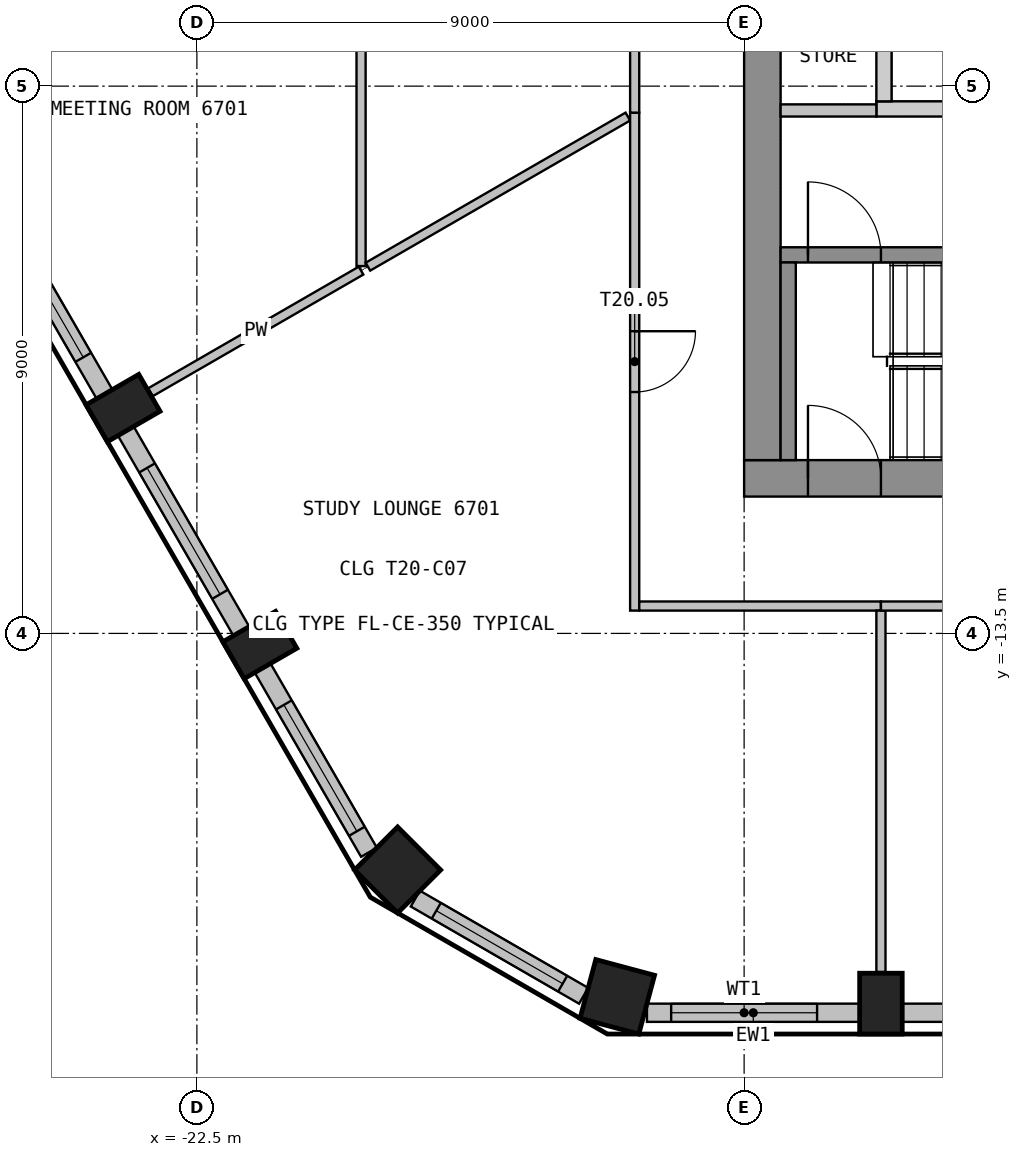
"""IFC4 building model, lengths in metres.
Left out: names, types, materials, properties, quantities, classifications, styles, units other than length and angle.
Written with IfcOpenShell. Run it as: python <this file> out.ifc"""

import sys

from ifc_helpers import new_model, si_unit, direction, frame, frame_2d, origin, origin_2d, place, context, subcontext, project, spatial, polyline, rectangle, outline, extrude, element, fill, save


model = new_model("IFC4")
c1 = context("Model", 3, precision=1e-05, world=origin(), true_north=direction((0.0, 1.0)))
c2 = subcontext(c1, "Body", "Model", "MODEL_VIEW")
j1 = project(units=[si_unit("LENGTHUNIT", "METRE"), si_unit("PLANEANGLEUNIT", "RADIAN")], contexts=[c1])
p1 = place(None, origin())
s1 = spatial("IfcSite", under=j1, at=p1, CompositionType="ELEMENT")
p2 = place(p1, origin())
s2 = spatial("IfcBuilding", under=s1, at=p2, CompositionType="ELEMENT")
p3 = place(p2, frame((0.0, 0.0, 270.3)))
s3 = spatial("IfcBuildingStorey", under=s2, at=p3, CompositionType="ELEMENT", Elevation=270.3)
p4 = place(p3, frame((-15.586, -19.476, 0.0), z_axis=(0.0, 0.0, 1.0), x_axis=(0.965925826289, -0.258819045103, 0.0)))
e1 = element("IfcColumn", 1, at=p4, inside=s3, PredefinedType="COLUMN", context=c2, shape_type="SweptSolid", body=[
    extrude(rectangle(XDim=1.0, YDim=1.0, at=origin_2d()), origin(), (0.0, 0.0, 1.0), 3.575),
])
for number, where, z_axis, x_axis in (
    (2, (-11.25, -19.588, 0.0), (0.0, 0.0, 1.0), (1.0, 0.0, 0.0)),
    (3, (-23.714, -9.794, 0.0), (0.0, 0.0, 1.0), (0.5, -0.866, 0.0)),
    (4, (-21.464, -13.691, 0.0), (0.0, 0.0, 1.0), (0.5, -0.866, 0.0)),
):
    element("IfcColumn", number, at=place(p3, frame(where, z_axis=z_axis, x_axis=x_axis)), inside=s3, PredefinedType="COLUMN", context=c2, shape_type="SweptSolid", body=[
        extrude(rectangle(XDim=0.7, YDim=1.0, at=origin_2d()), origin(), (0.0, 0.0, 1.0), 3.575),
    ])
p5 = place(p3, frame((-19.199, -17.39, 0.0), z_axis=(0.0, 0.0, 1.0), x_axis=(0.707106781187, -0.707106781187, 0.0)))
e5 = element("IfcColumn", 5, at=p5, inside=s3, PredefinedType="COLUMN", context=c2, shape_type="SweptSolid", body=[
    extrude(rectangle(XDim=1.0, YDim=1.0, at=origin_2d()), origin(), (0.0, 0.0, 1.0), 3.575),
])
p6 = place(p3, frame((-15.098, -19.739, 0.0), z_axis=(0.0, 0.0, 1.0), x_axis=(1.0, 0.0, 0.0)))
e6 = element("IfcWall", 6, at=p6, inside=s3, PredefinedType="SOLIDWALL", context=c2, shape_type="SweptSolid", body=[
    extrude(rectangle(XDim=3.498, YDim=0.3, at=frame_2d((1.749, 0.0))), origin(), (0.0, 0.0, 1.0), 3.575),
])
p7 = place(p6, frame((0.398, 0.0, 0.9)))
e7 = element("IfcOpeningElement", 7, at=p7, cuts=e6, PredefinedType="OPENING", context=c2, shape_type="SweptSolid", body=[
    extrude(rectangle(XDim=2.4, YDim=2.1, at=frame_2d((1.2, 1.05))), frame((0.0, 0.16, 0.0), z_axis=(0.0, -1.0, 0.0), x_axis=(1.0, 0.0, 0.0)), (0.0, 0.0, 1.0), 0.32),
])
p8 = place(p3, frame((-10.899, -19.739, 0.0), z_axis=(0.0, 0.0, 1.0), x_axis=(1.0, 0.0, 0.0)))
e8 = element("IfcWall", 8, at=p8, inside=s3, PredefinedType="SOLIDWALL", context=c2, shape_type="SweptSolid", body=[
    extrude(rectangle(XDim=3.799, YDim=0.3, at=frame_2d((1.899, 0.0))), origin(), (0.0, 0.0, 1.0), 3.575),
])
p9 = place(p8, frame((0.699, 0.0, 0.9)))
e9 = element("IfcOpeningElement", 9, at=p9, cuts=e8, PredefinedType="OPENING", context=c2, shape_type="SweptSolid", body=[
    extrude(rectangle(XDim=2.4, YDim=2.1, at=frame_2d((1.2, 1.05))), frame((0.0, 0.16, 0.0), z_axis=(0.0, -1.0, 0.0), x_axis=(1.0, 0.0, 0.0)), (0.0, 0.0, 1.0), 0.32),
])
p10 = place(p3, frame((-25.919, -6.276, 0.0), z_axis=(0.0, 0.0, 1.0), x_axis=(0.499982058975, -0.866035761792, 0.0)))
e10 = element("IfcWall", 10, at=p10, inside=s3, PredefinedType="SOLIDWALL", context=c2, shape_type="SweptSolid", body=[
    extrude(rectangle(XDim=3.799, YDim=0.3, at=frame_2d((1.899, 0.0))), origin(), (0.0, 0.0, 1.0), 3.575),
])
p11 = place(p10, frame((0.699, 0.0, 0.9)))
e11 = element("IfcOpeningElement", 11, at=p11, cuts=e10, PredefinedType="OPENING", context=c2, shape_type="SweptSolid", body=[
    extrude(rectangle(XDim=2.4, YDim=2.1, at=frame_2d((1.2, 1.05))), frame((0.0, 0.16, 0.0), z_axis=(0.0, -1.0, 0.0), x_axis=(1.0, 0.0, 0.0)), (0.0, 0.0, 1.0), 0.32),
])
p12 = place(p3, frame((-23.669, -10.173, 0.0), z_axis=(0.0, 0.0, 1.0), x_axis=(0.499982058975, -0.866035761792, 0.0)))
e12 = element("IfcWall", 12, at=p12, inside=s3, PredefinedType="SOLIDWALL", context=c2, shape_type="SweptSolid", body=[
    extrude(rectangle(XDim=3.799, YDim=0.3, at=frame_2d((1.899, 0.0))), origin(), (0.0, 0.0, 1.0), 3.575),
])
p13 = place(p12, frame((0.699, 0.0, 0.9)))
e13 = element("IfcOpeningElement", 13, at=p13, cuts=e12, PredefinedType="OPENING", context=c2, shape_type="SweptSolid", body=[
    extrude(rectangle(XDim=2.4, YDim=2.1, at=frame_2d((1.2, 1.05))), frame((0.0, 0.16, 0.0), z_axis=(0.0, -1.0, 0.0), x_axis=(1.0, 0.0, 0.0)), (0.0, 0.0, 1.0), 0.32),
])
p14 = place(p3, frame((-21.419, -14.07, 0.0), z_axis=(0.0, 0.0, 1.0), x_axis=(0.499960102815, -0.866048437209, 0.0)))
e14 = element("IfcWall", 14, at=p14, inside=s3, PredefinedType="SOLIDWALL", context=c2, shape_type="SweptSolid", body=[
    extrude(rectangle(XDim=3.498, YDim=0.3, at=frame_2d((1.749, 0.0))), origin(), (0.0, 0.0, 1.0), 3.575),
])
p15 = place(p14, frame((0.699, 0.0, 0.9)))
e15 = element("IfcOpeningElement", 15, at=p15, cuts=e14, PredefinedType="OPENING", context=c2, shape_type="SweptSolid", body=[
    extrude(rectangle(XDim=2.4, YDim=2.1, at=frame_2d((1.2, 1.05))), frame((0.0, 0.16, 0.0), z_axis=(0.0, -1.0, 0.0), x_axis=(1.0, 0.0, 0.0)), (0.0, 0.0, 1.0), 0.32),
])
p16 = place(p3, frame((-18.908, -17.861, 0.0), z_axis=(0.0, 0.0, 1.0), x_axis=(0.866025316205, -0.500000151692, 0.0)))
e16 = element("IfcWall", 16, at=p16, inside=s3, PredefinedType="SOLIDWALL", context=c2, shape_type="SweptSolid", body=[
    extrude(rectangle(XDim=3.196, YDim=0.3, at=frame_2d((1.598, 0.0))), origin(), (0.0, 0.0, 1.0), 3.575),
])
p17 = place(p16, frame((0.398, 0.0, 0.9)))
e17 = element("IfcOpeningElement", 17, at=p17, cuts=e16, PredefinedType="OPENING", context=c2, shape_type="SweptSolid", body=[
    extrude(rectangle(XDim=2.4, YDim=2.1, at=frame_2d((1.2, 1.05))), frame((0.0, 0.16, 0.0), z_axis=(0.0, -1.0, 0.0), x_axis=(1.0, 0.0, 0.0)), (0.0, 0.0, 1.0), 0.32),
])
p18 = place(p3, frame((-13.5, -10.95, 0.0), z_axis=(0.0, 0.0, 1.0), x_axis=(1.0, 0.0, 0.0)))
e18 = element("IfcWall", 18, at=p18, inside=s3, PredefinedType="SHEAR", context=c2, shape_type="SweptSolid", body=[
    extrude(rectangle(XDim=27.0, YDim=0.6, at=frame_2d((13.5, 0.0))), origin(), (0.0, 0.0, 1.0), 3.575),
])
p19 = place(p18, frame((12.3, 0.0, 0.0)))
e19 = element("IfcOpeningElement", 19, at=p19, cuts=e18, PredefinedType="OPENING", context=c2, shape_type="SweptSolid", body=[
    extrude(rectangle(XDim=2.4, YDim=2.1, at=frame_2d((1.2, 1.05))), frame((0.0, 0.31, 0.0), z_axis=(0.0, -1.0, 0.0), x_axis=(1.0, 0.0, 0.0)), (0.0, 0.0, 1.0), 0.62),
])
p20 = place(p18, frame((1.05, 0.0, 0.0)))
e20 = element("IfcOpeningElement", 20, at=p20, cuts=e18, PredefinedType="OPENING", context=c2, shape_type="SweptSolid", body=[
    extrude(rectangle(XDim=1.2, YDim=2.1, at=frame_2d((0.6, 1.05))), frame((0.0, 0.31, 0.0), z_axis=(0.0, -1.0, 0.0), x_axis=(1.0, 0.0, 0.0)), (0.0, 0.0, 1.0), 0.62),
])
p21 = place(p18, frame((24.75, 0.0, 0.0)))
e21 = element("IfcOpeningElement", 21, at=p21, cuts=e18, PredefinedType="OPENING", context=c2, shape_type="SweptSolid", body=[
    extrude(rectangle(XDim=1.2, YDim=2.1, at=frame_2d((0.6, 1.05))), frame((0.0, 0.31, 0.0), z_axis=(0.0, -1.0, 0.0), x_axis=(1.0, 0.0, 0.0)), (0.0, 0.0, 1.0), 0.62),
])
p22 = place(p3, frame((-13.2, -10.65, 0.0), z_axis=(0.0, 0.0, 1.0), x_axis=(0.0, 1.0, 0.0)))
e22 = element("IfcWall", 22, at=p22, inside=s3, PredefinedType="SHEAR", context=c2, shape_type="SweptSolid", body=[
    extrude(rectangle(XDim=21.3, YDim=0.6, at=frame_2d((10.65, 0.0))), origin(), (0.0, 0.0, 1.0), 3.575),
])
p23 = place(p22, frame((9.45, 0.0, 0.0)))
e23 = element("IfcOpeningElement", 23, at=p23, cuts=e22, PredefinedType="OPENING", context=c2, shape_type="SweptSolid", body=[
    extrude(rectangle(XDim=2.4, YDim=2.1, at=frame_2d((1.2, 1.05))), frame((0.0, 0.31, 0.0), z_axis=(0.0, -1.0, 0.0), x_axis=(1.0, 0.0, 0.0)), (0.0, 0.0, 1.0), 0.62),
])
p24 = place(p3, origin())
e24 = element("IfcWall", 24, at=p24, inside=s3, PredefinedType="SHEAR", context=c2, shape_type="SweptSolid", body=[
    extrude(outline(polyline([(-11.325, -5.0), (-2.675, -5.0), (-2.675, -4.75), (-11.325, -4.75), (-11.325, -5.0)])), origin(), (0.0, 0.0, 1.0), 3.575),
])
p25 = place(p3, origin())
e25 = element("IfcWall", 25, at=p25, inside=s3, PredefinedType="SHEAR", context=c2, shape_type="SweptSolid", body=[
    extrude(outline(polyline([(-11.325, -4.75), (-11.075, -4.75), (-11.075, -2.05), (-11.325, -2.05), (-11.325, -4.75)])), origin(), (0.0, 0.0, 1.0), 3.575),
])
p26 = place(p3, frame((-12.9, -7.275, 0.0), z_axis=(0.0, 0.0, 1.0), x_axis=(1.0, 0.0, 0.0)))
e26 = element("IfcWall", 26, at=p26, inside=s3, PredefinedType="SHEAR", context=c2, shape_type="SweptSolid", body=[
    extrude(rectangle(XDim=10.1, YDim=0.25, at=frame_2d((5.05, 0.0))), origin(), (0.0, 0.0, 1.0), 3.575),
])
p27 = place(p26, frame((0.45, 0.0, 0.0)))
e27 = element("IfcOpeningElement", 27, at=p27, cuts=e26, PredefinedType="OPENING", context=c2, shape_type="SweptSolid", body=[
    extrude(rectangle(XDim=1.2, YDim=2.1, at=frame_2d((0.6, 1.05))), frame((0.0, 0.135, 0.0), z_axis=(0.0, -1.0, 0.0), x_axis=(1.0, 0.0, 0.0)), (0.0, 0.0, 1.0), 0.27),
])
p28 = place(p3, frame((-12.775, -10.65, 0.0), z_axis=(0.0, 0.0, 1.0), x_axis=(0.0, 1.0, 0.0)))
e28 = element("IfcWall", 28, at=p28, inside=s3, PredefinedType="SHEAR", context=c2, shape_type="SweptSolid", body=[
    extrude(rectangle(XDim=3.25, YDim=0.25, at=frame_2d((1.625, 0.0))), origin(), (0.0, 0.0, 1.0), 3.575),
])
p29 = place(p3, frame((-12.9, -4.9, 0.0), z_axis=(0.0, 0.0, 1.0), x_axis=(1.0, 0.0, 0.0)))
e29 = element("IfcWall", 29, at=p29, inside=s3, PredefinedType="PARTITIONING", context=c2, shape_type="SweptSolid", body=[
    extrude(rectangle(XDim=1.575, YDim=0.2, at=frame_2d((0.788, 0.0))), origin(), (0.0, 0.0, 1.0), 3.575),
])
p30 = place(p3, frame((-19.8, -7.534, 0.0), z_axis=(0.0, 0.0, 1.0), x_axis=(-0.865984319305, -0.500071153655, 0.0)))
e30 = element("IfcWall", 30, at=p30, inside=s3, PredefinedType="PARTITIONING", context=c2, shape_type="SweptSolid", body=[
    extrude(rectangle(XDim=4.0, YDim=0.15, at=frame_2d((2.0, 0.0))), origin(), (0.0, 0.0, 1.0), 3.575),
])
p31 = place(p3, frame((-19.8, -2.325, 0.0), z_axis=(0.0, 0.0, 1.0), x_axis=(0.0, -1.0, 0.0)))
e31 = element("IfcWall", 31, at=p31, inside=s3, PredefinedType="PARTITIONING", context=c2, shape_type="SweptSolid", body=[
    extrude(rectangle(XDim=5.134, YDim=0.15, at=frame_2d((2.567, 0.0))), origin(), (0.0, 0.0, 1.0), 3.575),
])
p32 = place(p3, frame((-15.413, -5.001, 0.0), z_axis=(0.0, 0.0, 1.0), x_axis=(-0.866034039096, -0.499985042903, 0.0)))
e32 = element("IfcWall", 32, at=p32, inside=s3, PredefinedType="PARTITIONING", context=c2, shape_type="SweptSolid", body=[
    extrude(rectangle(XDim=4.936, YDim=0.15, at=frame_2d((2.468, 0.0))), origin(), (0.0, 0.0, 1.0), 3.575),
])
p33 = place(p3, frame((-15.3, -4.936, 0.0), z_axis=(0.0, 0.0, 1.0), x_axis=(0.0, -1.0, 0.0)))
e33 = element("IfcWall", 33, at=p33, inside=s3, PredefinedType="PARTITIONING", context=c2, shape_type="SweptSolid", body=[
    extrude(rectangle(XDim=8.189, YDim=0.15, at=frame_2d((4.094, 0.0))), origin(), (0.0, 0.0, 1.0), 3.575),
])
p34 = place(p33, frame((3.594, 0.0, 0.0)))
e34 = element("IfcOpeningElement", 34, at=p34, cuts=e33, PredefinedType="OPENING", context=c2, shape_type="SweptSolid", body=[
    extrude(rectangle(XDim=1.0, YDim=2.1, at=frame_2d((0.5, 1.05))), frame((0.0, 0.085, 0.0), z_axis=(0.0, -1.0, 0.0), x_axis=(1.0, 0.0, 0.0)), (0.0, 0.0, 1.0), 0.17),
])
p35 = place(p3, frame((-15.225, -13.05, 0.0), z_axis=(0.0, 0.0, 1.0), x_axis=(1.0, 0.0, 0.0)))
e35 = element("IfcWall", 35, at=p35, inside=s3, PredefinedType="PARTITIONING", context=c2, shape_type="SweptSolid", body=[
    extrude(rectangle(XDim=3.975, YDim=0.15, at=frame_2d((1.988, 0.0))), origin(), (0.0, 0.0, 1.0), 3.575),
])
p36 = place(p3, frame((-15.3, -2.325, 0.0), z_axis=(0.0, 0.0, 1.0), x_axis=(0.0, -1.0, 0.0)))
e36 = element("IfcWall", 36, at=p36, inside=s3, PredefinedType="PARTITIONING", context=c2, shape_type="SweptSolid", body=[
    extrude(rectangle(XDim=2.611, YDim=0.15, at=frame_2d((1.306, 0.0))), origin(), (0.0, 0.0, 1.0), 3.575),
])
p37 = place(p3, frame((-11.25, -13.125, 0.0), z_axis=(0.0, 0.0, 1.0), x_axis=(0.0, -1.0, 0.0)))
e37 = element("IfcWall", 37, at=p37, inside=s3, PredefinedType="PARTITIONING", context=c2, shape_type="SweptSolid", body=[
    extrude(rectangle(XDim=5.944, YDim=0.15, at=frame_2d((2.972, 0.0))), origin(), (0.0, 0.0, 1.0), 3.575),
])
p38 = place(p3, frame((-11.25, -13.05, 0.0), z_axis=(0.0, 0.0, 1.0), x_axis=(1.0, 0.0, 0.0)))
e38 = element("IfcWall", 38, at=p38, inside=s3, PredefinedType="PARTITIONING", context=c2, shape_type="SweptSolid", body=[
    extrude(rectangle(XDim=13.5, YDim=0.15, at=frame_2d((6.75, 0.0))), origin(), (0.0, 0.0, 1.0), 3.575),
])
p39 = place(p38, frame((6.25, 0.0, 0.0)))
e39 = element("IfcOpeningElement", 39, at=p39, cuts=e38, PredefinedType="OPENING", context=c2, shape_type="SweptSolid", body=[
    extrude(rectangle(XDim=1.0, YDim=2.1, at=frame_2d((0.5, 1.05))), frame((0.0, 0.085, 0.0), z_axis=(0.0, -1.0, 0.0), x_axis=(1.0, 0.0, 0.0)), (0.0, 0.0, 1.0), 0.17),
])
p40 = place(p7, origin())
e40 = element("IfcWindow", 40, at=p40, inside=s3, PartitioningType="SINGLE_PANEL", PredefinedType="WINDOW", context=c2, shape_type="SweptSolid", body=[
    extrude(rectangle(XDim=2.4, YDim=2.1, at=frame_2d((1.2, 1.05))), frame((0.0, 0.03, 0.0), z_axis=(0.0, -1.0, 0.0), x_axis=(1.0, 0.0, 0.0)), (0.0, 0.0, 1.0), 0.06),
])
fill(e7, e40)
p41 = place(p11, origin())
e41 = element("IfcWindow", 41, at=p41, inside=s3, PartitioningType="SINGLE_PANEL", PredefinedType="WINDOW", context=c2, shape_type="SweptSolid", body=[
    extrude(rectangle(XDim=2.4, YDim=2.1, at=frame_2d((1.2, 1.05))), frame((0.0, 0.03, 0.0), z_axis=(0.0, -1.0, 0.0), x_axis=(1.0, 0.0, 0.0)), (0.0, 0.0, 1.0), 0.06),
])
fill(e11, e41)
p42 = place(p13, origin())
e42 = element("IfcWindow", 42, at=p42, inside=s3, PartitioningType="SINGLE_PANEL", PredefinedType="WINDOW", context=c2, shape_type="SweptSolid", body=[
    extrude(rectangle(XDim=2.4, YDim=2.1, at=frame_2d((1.2, 1.05))), frame((0.0, 0.03, 0.0), z_axis=(0.0, -1.0, 0.0), x_axis=(1.0, 0.0, 0.0)), (0.0, 0.0, 1.0), 0.06),
])
fill(e13, e42)
p43 = place(p15, origin())
e43 = element("IfcWindow", 43, at=p43, inside=s3, PartitioningType="SINGLE_PANEL", PredefinedType="WINDOW", context=c2, shape_type="SweptSolid", body=[
    extrude(rectangle(XDim=2.4, YDim=2.1, at=frame_2d((1.2, 1.05))), frame((0.0, 0.03, 0.0), z_axis=(0.0, -1.0, 0.0), x_axis=(1.0, 0.0, 0.0)), (0.0, 0.0, 1.0), 0.06),
])
fill(e15, e43)
p44 = place(p17, origin())
e44 = element("IfcWindow", 44, at=p44, inside=s3, PartitioningType="SINGLE_PANEL", PredefinedType="WINDOW", context=c2, shape_type="SweptSolid", body=[
    extrude(rectangle(XDim=2.4, YDim=2.1, at=frame_2d((1.2, 1.05))), frame((0.0, 0.03, 0.0), z_axis=(0.0, -1.0, 0.0), x_axis=(1.0, 0.0, 0.0)), (0.0, 0.0, 1.0), 0.06),
])
fill(e17, e44)
p45 = place(p20, origin())
e45 = element("IfcDoor", 45, at=p45, inside=s3, OperationType="SINGLE_SWING_RIGHT", PredefinedType="DOOR", context=c2, shape_type="SweptSolid", body=[
    extrude(rectangle(XDim=1.2, YDim=2.1, at=frame_2d((0.6, 1.05))), frame((0.0, 0.025, 0.0), z_axis=(0.0, -1.0, 0.0), x_axis=(1.0, 0.0, 0.0)), (0.0, 0.0, 1.0), 0.05),
])
fill(e20, e45)
p46 = place(p27, origin())
e46 = element("IfcDoor", 46, at=p46, inside=s3, OperationType="SINGLE_SWING_LEFT", PredefinedType="DOOR", context=c2, shape_type="SweptSolid", body=[
    extrude(rectangle(XDim=1.2, YDim=2.1, at=frame_2d((0.6, 1.05))), frame((0.0, 0.025, 0.0), z_axis=(0.0, -1.0, 0.0), x_axis=(1.0, 0.0, 0.0)), (0.0, 0.0, 1.0), 0.05),
])
fill(e27, e46)
p47 = place(p34, origin())
e47 = element("IfcDoor", 47, at=p47, inside=s3, OperationType="SINGLE_SWING_RIGHT", PredefinedType="DOOR", context=c2, shape_type="SweptSolid", body=[
    extrude(rectangle(XDim=1.0, YDim=2.1, at=frame_2d((0.5, 1.05))), frame((0.0, 0.025, 0.0), z_axis=(0.0, -1.0, 0.0), x_axis=(1.0, 0.0, 0.0)), (0.0, 0.0, 1.0), 0.05),
])
fill(e34, e47)
save(model, sys.argv[1])
